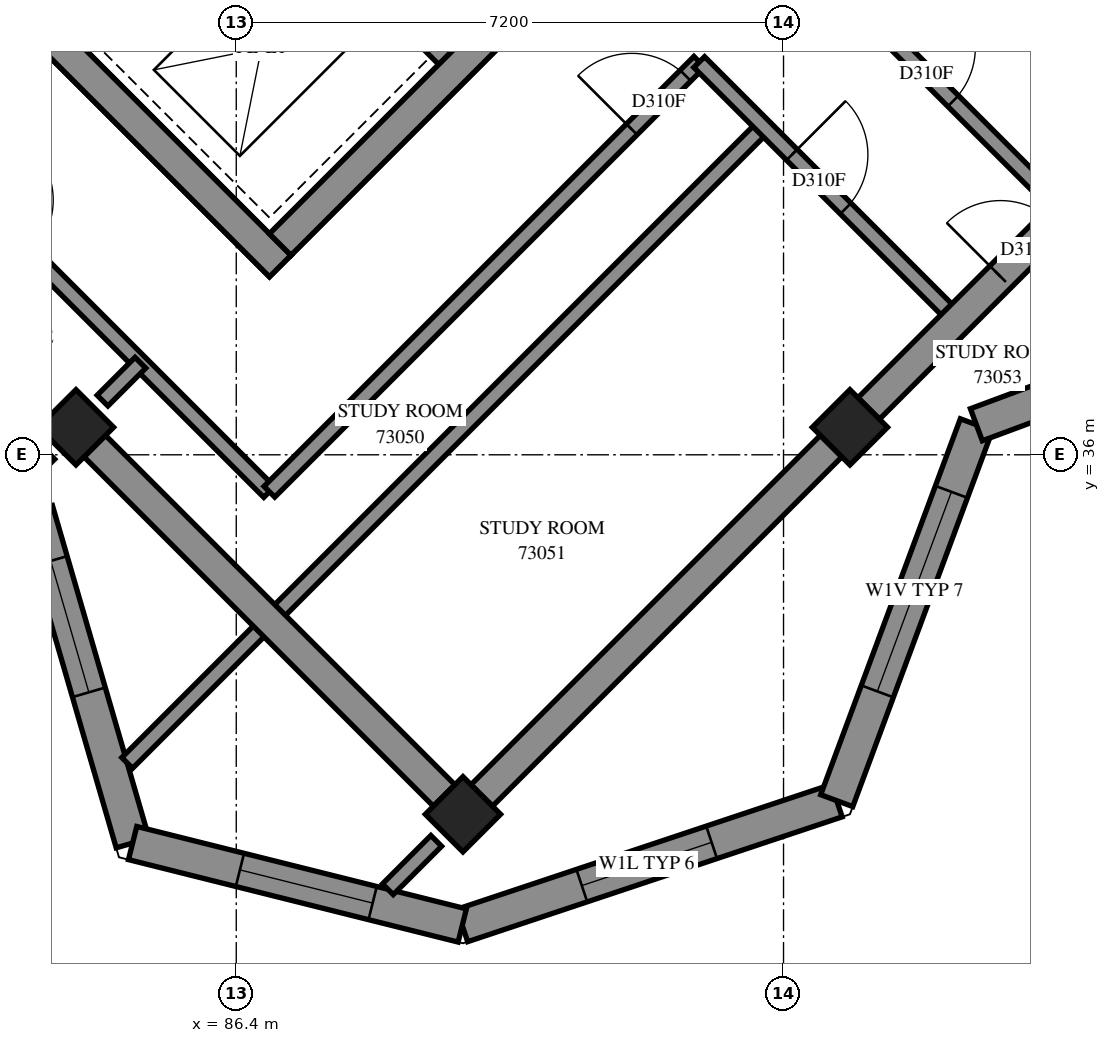
"""IFC4 building model, lengths in metres.
Left out: names, types, materials, properties, quantities, classifications, styles, units other than length and angle.
Written with IfcOpenShell. Run it as: python <this file> out.ifc"""

import sys

from ifc_helpers import new_model, si_unit, direction, frame, frame_2d, origin, origin_2d, place, context, subcontext, project, spatial, polyline, rectangle, outline, extrude, element, fill, save


model = new_model("IFC4")
c1 = context("Model", 3, precision=1e-05, world=origin(), true_north=direction((0.0, 1.0)))
c2 = subcontext(c1, "Body", "Model", "MODEL_VIEW")
j1 = project(units=[si_unit("LENGTHUNIT", "METRE"), si_unit("PLANEANGLEUNIT", "RADIAN")], contexts=[c1])
p1 = place(None, origin())
s1 = spatial("IfcSite", under=j1, at=p1, CompositionType="ELEMENT")
p2 = place(p1, origin())
s2 = spatial("IfcBuilding", under=s1, at=p2, CompositionType="ELEMENT")
p3 = place(p2, frame((0.0, 0.0, 267.6)))
s3 = spatial("IfcBuildingStorey", under=s2, at=p3, CompositionType="ELEMENT", Elevation=267.6)
for number, where, z_axis, x_axis in (
    (1, (84.291, 36.362, 0.0), (0.0, 0.0, 1.0), (0.707, -0.707, 0.0)),
    (2, (94.474, 36.362, 0.0), (0.0, 0.0, 1.0), (0.707, -0.707, 0.0)),
    (3, (89.382, 31.271, 0.0), (0.0, 0.0, 1.0), (0.707, -0.707, 0.0)),
):
    element("IfcColumn", number, at=place(p3, frame(where, z_axis=z_axis, x_axis=x_axis)), inside=s3, PredefinedType="COLUMN", context=c2, shape_type="SweptSolid", body=[
        extrude(rectangle(XDim=0.7, YDim=0.7, at=origin_2d()), origin(), (0.0, 0.0, 1.0), 3.1),
    ])
p4 = place(p3, frame((76.23, 49.231, -0.3), z_axis=(0.0, 0.0, 1.0), x_axis=(0.7071034917, -0.7071100706, 0.0)))
e4 = element("IfcWall", 4, at=p4, inside=s3, PredefinedType="SHEAR", context=c2, shape_type="SweptSolid", body=[
    extrude(rectangle(XDim=15.2, YDim=0.4, at=frame_2d((7.6, 0.0))), origin(), (0.0, 0.0, 1.0), 2.7),
])
p5 = place(p3, frame((86.978, 38.766, -0.3), z_axis=(0.0, 0.0, 1.0), x_axis=(0.7071067812, 0.7071067812, 0.0)))
e5 = element("IfcWall", 5, at=p5, inside=s3, PredefinedType="SHEAR", context=c2, shape_type="SweptSolid", body=[
    extrude(rectangle(XDim=14.4, YDim=0.4, at=frame_2d((7.2, 0.0))), origin(), (0.0, 0.0, 1.0), 2.7),
])
p6 = place(p5, frame((4.55, 0.0, 0.3)))
e6 = element("IfcOpeningElement", 6, at=p6, cuts=e5, PredefinedType="OPENING", context=c2, shape_type="SweptSolid", body=[
    extrude(rectangle(XDim=1.1, YDim=2.1, at=frame_2d((0.55, 1.05))), frame((0.0, 0.21, 0.0), z_axis=(0.0, -1.0, 0.0), x_axis=(1.0, 0.0, 0.0)), (0.0, 0.0, 1.0), 0.42),
])
p7 = place(p5, frame((11.35, 0.0, 0.3)))
e7 = element("IfcOpeningElement", 7, at=p7, cuts=e5, PredefinedType="OPENING", context=c2, shape_type="SweptSolid", body=[
    extrude(rectangle(XDim=1.1, YDim=2.1, at=frame_2d((0.55, 1.05))), frame((0.0, 0.21, 0.0), z_axis=(0.0, -1.0, 0.0), x_axis=(1.0, 0.0, 0.0)), (0.0, 0.0, 1.0), 0.42),
])
p8 = place(p3, frame((78.988, 51.423, 0.0), z_axis=(0.0, 0.0, 1.0), x_axis=(0.7071067812, -0.7071067812, 0.0)))
e8 = element("IfcWall", 8, at=p8, inside=s3, PredefinedType="SOLIDWALL", context=c2, shape_type="SweptSolid", body=[
    extrude(rectangle(XDim=14.4, YDim=0.3, at=frame_2d((7.2, 0.0))), origin(), (0.0, 0.0, 1.0), 3.1),
])
p9 = place(p8, frame((4.95, 0.0, 0.0)))
e9 = element("IfcOpeningElement", 9, at=p9, cuts=e8, PredefinedType="OPENING", context=c2, shape_type="SweptSolid", body=[
    extrude(rectangle(XDim=0.9, YDim=2.1, at=frame_2d((0.45, 1.05))), frame((0.0, 0.16, 0.0), z_axis=(0.0, -1.0, 0.0), x_axis=(1.0, 0.0, 0.0)), (0.0, 0.0, 1.0), 0.32),
])
p10 = place(p8, frame((8.55, 0.0, 0.0)))
e10 = element("IfcOpeningElement", 10, at=p10, cuts=e8, PredefinedType="OPENING", context=c2, shape_type="SweptSolid", body=[
    extrude(rectangle(XDim=0.9, YDim=2.1, at=frame_2d((0.45, 1.05))), frame((0.0, 0.16, 0.0), z_axis=(0.0, -1.0, 0.0), x_axis=(1.0, 0.0, 0.0)), (0.0, 0.0, 1.0), 0.32),
])
p11 = place(p8, frame((12.05, 0.0, 0.0)))
e11 = element("IfcOpeningElement", 11, at=p11, cuts=e8, PredefinedType="OPENING", context=c2, shape_type="SweptSolid", body=[
    extrude(rectangle(XDim=1.1, YDim=2.1, at=frame_2d((0.55, 1.05))), frame((0.0, 0.16, 0.0), z_axis=(0.0, -1.0, 0.0), x_axis=(1.0, 0.0, 0.0)), (0.0, 0.0, 1.0), 0.32),
])
p12 = place(p3, frame((89.373, 29.808, 0.0), z_axis=(0.0, 0.0, 1.0), x_axis=(0.9486871491, 0.3162162126, 0.0)))
e12 = element("IfcWall", 12, at=p12, inside=s3, PredefinedType="SOLIDWALL", context=c2, shape_type="SweptSolid", body=[
    extrude(outline(polyline([(-0.066, -0.225), (5.301, -0.225), (5.085, 0.225), (0.066, 0.225), (-0.066, -0.225)])), origin(), (0.0, 0.0, 1.0), 3.1),
])
p13 = place(p12, frame((1.658, 0.0, 0.6)))
e13 = element("IfcOpeningElement", 13, at=p13, cuts=e12, PredefinedType="OPENING", context=c2, shape_type="SweptSolid", body=[
    extrude(rectangle(XDim=1.8, YDim=1.9, at=frame_2d((0.9, 0.95))), frame((0.0, 0.235, 0.0), z_axis=(0.0, -1.0, 0.0), x_axis=(1.0, 0.0, 0.0)), (0.0, 0.0, 1.0), 0.47),
])
p14 = place(p3, frame((94.3, 31.45, 0.0), z_axis=(0.0, 0.0, 1.0), x_axis=(0.3481927166, 0.9374229739, 0.0)))
e14 = element("IfcWall", 14, at=p14, inside=s3, PredefinedType="SOLIDWALL", context=c2, shape_type="SweptSolid", body=[
    extrude(outline(polyline([(-0.108, -0.225), (5.172, -0.225), (5.379, 0.225), (0.108, 0.225), (-0.108, -0.225)])), origin(), (0.0, 0.0, 1.0), 3.1),
])
p15 = place(p14, frame((1.534, 0.0, 0.45)))
e15 = element("IfcOpeningElement", 15, at=p15, cuts=e14, PredefinedType="OPENING", context=c2, shape_type="SweptSolid", body=[
    extrude(rectangle(XDim=2.8, YDim=2.55, at=frame_2d((1.4, 1.275))), frame((0.0, 0.235, 0.0), z_axis=(0.0, -1.0, 0.0), x_axis=(1.0, 0.0, 0.0)), (0.0, 0.0, 1.0), 0.47),
])
p16 = place(p3, frame((96.137, 36.395, 0.0), z_axis=(0.0, 0.0, 1.0), x_axis=(0.937429161, 0.3481760591, 0.0)))
e16 = element("IfcWall", 16, at=p16, inside=s3, PredefinedType="SOLIDWALL", context=c2, shape_type="SweptSolid", body=[
    extrude(outline(polyline([(0.103, -0.225), (5.383, -0.225), (5.168, 0.225), (-0.103, 0.225), (0.103, -0.225)])), origin(), (0.0, 0.0, 1.0), 3.1),
])
p17 = place(p16, frame((1.651, 0.0, 0.45)))
e17 = element("IfcOpeningElement", 17, at=p17, cuts=e16, PredefinedType="OPENING", context=c2, shape_type="SweptSolid", body=[
    extrude(rectangle(XDim=2.8, YDim=2.55, at=frame_2d((1.4, 1.275))), frame((0.0, 0.235, 0.0), z_axis=(0.0, -1.0, 0.0), x_axis=(1.0, 0.0, 0.0)), (0.0, 0.0, 1.0), 0.47),
])
p18 = place(p3, frame((83.765, 35.271, 0.0), z_axis=(0.0, 0.0, 1.0), x_axis=(0.278831726, -0.9603399755, 0.0)))
e18 = element("IfcWall", 18, at=p18, inside=s3, PredefinedType="SOLIDWALL", context=c2, shape_type="SweptSolid", body=[
    extrude(outline(polyline([(0.124, -0.225), (4.689, -0.225), (4.43, 0.225), (-0.124, 0.225), (0.124, -0.225)])), origin(), (0.0, 0.0, 1.0), 2.6),
])
p19 = place(p18, frame((0.695, 0.0, 0.6)))
e19 = element("IfcOpeningElement", 19, at=p19, cuts=e18, PredefinedType="OPENING", context=c2, shape_type="SweptSolid", body=[
    extrude(rectangle(XDim=1.8, YDim=1.9, at=frame_2d((0.9, 0.95))), frame((0.0, 0.235, 0.0), z_axis=(0.0, -1.0, 0.0), x_axis=(1.0, 0.0, 0.0)), (0.0, 0.0, 1.0), 0.47),
])
p20 = place(p3, frame((85.037, 30.892, 0.0), z_axis=(0.0, 0.0, 1.0), x_axis=(0.970134604, -0.2425672073, 0.0)))
e20 = element("IfcWall", 20, at=p20, inside=s3, PredefinedType="SOLIDWALL", context=c2, shape_type="SweptSolid", body=[
    extrude(outline(polyline([(-0.129, -0.225), (4.536, -0.225), (4.405, 0.225), (0.129, 0.225), (-0.129, -0.225)])), origin(), (0.0, 0.0, 1.0), 2.6),
])
p21 = place(p20, frame((1.455, 0.0, 0.6)))
e21 = element("IfcOpeningElement", 21, at=p21, cuts=e20, PredefinedType="OPENING", context=c2, shape_type="SweptSolid", body=[
    extrude(rectangle(XDim=1.8, YDim=1.9, at=frame_2d((0.9, 0.95))), frame((0.0, 0.235, 0.0), z_axis=(0.0, -1.0, 0.0), x_axis=(1.0, 0.0, 0.0)), (0.0, 0.0, 1.0), 0.47),
])
p22 = place(p3, frame((84.965, 31.946, 0.0), z_axis=(0.0, 0.0, 1.0), x_axis=(0.7070265824, 0.7071869709, 0.0)))
e22 = element("IfcWall", 22, at=p22, inside=s3, PredefinedType="PARTITIONING", context=c2, shape_type="SweptSolid", body=[
    extrude(rectangle(XDim=11.846, YDim=0.2, at=frame_2d((5.923, 0.0))), origin(), (0.0, 0.0, 1.0), 3.1),
])
p23 = place(p3, frame((80.747, 41.597, 0.0), z_axis=(0.0, 0.0, 1.0), x_axis=(0.7071067812, -0.7071067812, 0.0)))
e23 = element("IfcWall", 23, at=p23, inside=s3, PredefinedType="PARTITIONING", context=c2, shape_type="SweptSolid", body=[
    extrude(rectangle(XDim=8.607, YDim=0.2, at=frame_2d((4.303, 0.0))), origin(), (0.0, 0.0, 1.0), 3.1),
])
p24 = place(p23, frame((0.195, 0.0, 0.0)))
e24 = element("IfcOpeningElement", 24, at=p24, cuts=e23, PredefinedType="OPENING", context=c2, shape_type="SweptSolid", body=[
    extrude(rectangle(XDim=1.0, YDim=2.1, at=frame_2d((0.5, 1.05))), frame((0.0, 0.11, 0.0), z_axis=(0.0, -1.0, 0.0), x_axis=(1.0, 0.0, 0.0)), (0.0, 0.0, 1.0), 0.22),
])
p25 = place(p23, frame((3.175, 0.0, 0.0)))
e25 = element("IfcOpeningElement", 25, at=p25, cuts=e23, PredefinedType="OPENING", context=c2, shape_type="SweptSolid", body=[
    extrude(rectangle(XDim=1.0, YDim=2.1, at=frame_2d((0.5, 1.05))), frame((0.0, 0.11, 0.0), z_axis=(0.0, -1.0, 0.0), x_axis=(1.0, 0.0, 0.0)), (0.0, 0.0, 1.0), 0.22),
])
p26 = place(p3, frame((86.836, 35.514, 0.0), z_axis=(0.0, 0.0, 1.0), x_axis=(0.7071067812, 0.7071067812, 0.0)))
e26 = element("IfcWall", 26, at=p26, inside=s3, PredefinedType="PARTITIONING", context=c2, shape_type="SweptSolid", body=[
    extrude(rectangle(XDim=7.999, YDim=0.2, at=frame_2d((3.999, 0.0))), origin(), (0.0, 0.0, 1.0), 3.1),
])
p27 = place(p26, frame((6.742, 0.0, 0.0)))
e27 = element("IfcOpeningElement", 27, at=p27, cuts=e26, PredefinedType="OPENING", context=c2, shape_type="SweptSolid", body=[
    extrude(rectangle(XDim=1.0, YDim=2.1, at=frame_2d((0.5, 1.05))), frame((0.0, 0.11, 0.0), z_axis=(0.0, -1.0, 0.0), x_axis=(1.0, 0.0, 0.0)), (0.0, 0.0, 1.0), 0.22),
])
p28 = place(p3, frame((89.731, 31.621, 0.0), z_axis=(0.0, 0.0, 1.0), x_axis=(0.7071067812, 0.7071067812, 0.0)))
e28 = element("IfcWall", 28, at=p28, inside=s3, PredefinedType="PARTITIONING", context=c2, shape_type="SweptSolid", body=[
    extrude(rectangle(XDim=6.211, YDim=0.2, at=frame_2d((3.106, 0.0))), origin(), (0.0, 0.0, 1.0), 2.6),
])
p29 = place(p3, frame((93.905, 42.581, 0.0), z_axis=(0.0, 0.0, 1.0), x_axis=(0.7071067812, -0.7071067812, 0.0)))
e29 = element("IfcWall", 29, at=p29, inside=s3, PredefinedType="PARTITIONING", context=c2, shape_type="SweptSolid", body=[
    extrude(rectangle(XDim=4.8, YDim=0.2, at=frame_2d((2.4, 0.0))), origin(), (0.0, 0.0, 1.0), 3.1),
])
p30 = place(p29, frame((1.725, 0.0, 0.0)))
e30 = element("IfcOpeningElement", 30, at=p30, cuts=e29, PredefinedType="OPENING", context=c2, shape_type="SweptSolid", body=[
    extrude(rectangle(XDim=1.0, YDim=2.1, at=frame_2d((0.5, 1.05))), frame((0.0, 0.11, 0.0), z_axis=(0.0, -1.0, 0.0), x_axis=(1.0, 0.0, 0.0)), (0.0, 0.0, 1.0), 0.22),
])
p31 = place(p3, frame((92.491, 41.167, 0.0), z_axis=(0.0, 0.0, 1.0), x_axis=(0.7071067812, -0.7071067812, 0.0)))
e31 = element("IfcWall", 31, at=p31, inside=s3, PredefinedType="PARTITIONING", context=c2, shape_type="SweptSolid", body=[
    extrude(rectangle(XDim=4.8, YDim=0.2, at=frame_2d((2.4, 0.0))), origin(), (0.0, 0.0, 1.0), 3.1),
])
p32 = place(p31, frame((1.725, 0.0, 0.0)))
e32 = element("IfcOpeningElement", 32, at=p32, cuts=e31, PredefinedType="OPENING", context=c2, shape_type="SweptSolid", body=[
    extrude(rectangle(XDim=1.0, YDim=2.1, at=frame_2d((0.5, 1.05))), frame((0.0, 0.11, 0.0), z_axis=(0.0, -1.0, 0.0), x_axis=(1.0, 0.0, 0.0)), (0.0, 0.0, 1.0), 0.22),
])
p33 = place(p3, frame((95.887, 37.777, 0.0), z_axis=(0.0, 0.0, 1.0), x_axis=(0.7071067812, 0.7071067812, 0.0)))
e33 = element("IfcWall", 33, at=p33, inside=s3, PredefinedType="PARTITIONING", context=c2, shape_type="SweptSolid", body=[
    extrude(rectangle(XDim=2.0, YDim=0.2, at=frame_2d((1.0, 0.0))), origin(), (0.0, 0.0, 1.0), 2.6),
])
p34 = place(p33, frame((0.803, 0.0, 0.0)))
e34 = element("IfcOpeningElement", 34, at=p34, cuts=e33, PredefinedType="OPENING", context=c2, shape_type="SweptSolid", body=[
    extrude(rectangle(XDim=1.0, YDim=2.1, at=frame_2d((0.5, 1.05))), frame((0.0, 0.11, 0.0), z_axis=(0.0, -1.0, 0.0), x_axis=(1.0, 0.0, 0.0)), (0.0, 0.0, 1.0), 0.22),
])
p35 = place(p3, frame((94.823, 36.713, 0.0), z_axis=(0.0, 0.0, 1.0), x_axis=(0.7071067812, 0.7071067812, 0.0)))
e35 = element("IfcWall", 35, at=p35, inside=s3, PredefinedType="PARTITIONING", context=c2, shape_type="SweptSolid", body=[
    extrude(rectangle(XDim=1.505, YDim=0.2, at=frame_2d((0.752, 0.0))), origin(), (0.0, 0.0, 1.0), 2.6),
])
p36 = place(p3, frame((88.394, 30.284, 0.0), z_axis=(0.0, 0.0, 1.0), x_axis=(0.7070512369, 0.7071623211, 0.0)))
e36 = element("IfcWall", 36, at=p36, inside=s3, PredefinedType="PARTITIONING", context=c2, shape_type="SweptSolid", body=[
    extrude(rectangle(XDim=0.9, YDim=0.2, at=frame_2d((0.45, 0.0))), origin(), (0.0, 0.0, 1.0), 2.6),
])
p37 = place(p3, frame((84.641, 36.713, 0.0), z_axis=(0.0, 0.0, 1.0), x_axis=(0.7071067812, 0.7071067812, 0.0)))
e37 = element("IfcWall", 37, at=p37, inside=s3, PredefinedType="PARTITIONING", context=c2, shape_type="SweptSolid", body=[
    extrude(rectangle(XDim=0.704, YDim=0.2, at=frame_2d((0.352, 0.0))), origin(), (0.0, 0.0, 1.0), 3.1),
])
p38 = place(p3, frame((83.506, 35.581, 0.0), z_axis=(0.0, 0.0, 1.0), x_axis=(0.7089790393, 0.7052295526, 0.0)))
e38 = element("IfcWall", 38, at=p38, inside=s3, PredefinedType="PARTITIONING", context=c2, shape_type="SweptSolid", body=[
    extrude(rectangle(XDim=0.613, YDim=0.2, at=frame_2d((0.307, 0.0))), origin(), (0.0, 0.0, 1.0), 2.6),
])
p39 = place(p13, origin())
e39 = element("IfcWindow", 39, at=p39, inside=s3, PartitioningType="SINGLE_PANEL", PredefinedType="WINDOW", context=c2, shape_type="SweptSolid", body=[
    extrude(rectangle(XDim=1.8, YDim=1.9, at=frame_2d((0.9, 0.95))), frame((0.0, 0.205, 0.0), z_axis=(0.0, -1.0, 0.0), x_axis=(1.0, 0.0, 0.0)), (0.0, 0.0, 1.0), 0.06),
])
fill(e13, e39)
p40 = place(p15, origin())
e40 = element("IfcWindow", 40, at=p40, inside=s3, PartitioningType="SINGLE_PANEL", PredefinedType="WINDOW", context=c2, shape_type="SweptSolid", body=[
    extrude(rectangle(XDim=2.8, YDim=2.55, at=frame_2d((1.4, 1.275))), frame((0.0, 0.205, 0.0), z_axis=(0.0, -1.0, 0.0), x_axis=(1.0, 0.0, 0.0)), (0.0, 0.0, 1.0), 0.06),
])
fill(e15, e40)
p41 = place(p19, origin())
e41 = element("IfcWindow", 41, at=p41, inside=s3, PartitioningType="SINGLE_PANEL", PredefinedType="WINDOW", context=c2, shape_type="SweptSolid", body=[
    extrude(rectangle(XDim=1.8, YDim=1.9, at=frame_2d((0.9, 0.95))), frame((0.0, 0.205, 0.0), z_axis=(0.0, -1.0, 0.0), x_axis=(1.0, 0.0, 0.0)), (0.0, 0.0, 1.0), 0.06),
])
fill(e19, e41)
p42 = place(p21, origin())
e42 = element("IfcWindow", 42, at=p42, inside=s3, PartitioningType="SINGLE_PANEL", PredefinedType="WINDOW", context=c2, shape_type="SweptSolid", body=[
    extrude(rectangle(XDim=1.8, YDim=1.9, at=frame_2d((0.9, 0.95))), frame((0.0, 0.205, 0.0), z_axis=(0.0, -1.0, 0.0), x_axis=(1.0, 0.0, 0.0)), (0.0, 0.0, 1.0), 0.06),
])
fill(e21, e42)
p43 = place(p27, origin())
e43 = element("IfcDoor", 43, at=p43, inside=s3, OperationType="SINGLE_SWING_RIGHT", PredefinedType="DOOR", context=c2, shape_type="SweptSolid", body=[
    extrude(rectangle(XDim=1.0, YDim=2.1, at=frame_2d((0.5, 1.05))), frame((0.0, 0.025, 0.0), z_axis=(0.0, -1.0, 0.0), x_axis=(1.0, 0.0, 0.0)), (0.0, 0.0, 1.0), 0.05),
])
fill(e27, e43)
p44 = place(p32, origin())
e44 = element("IfcDoor", 44, at=p44, inside=s3, OperationType="SINGLE_SWING_LEFT", PredefinedType="DOOR", context=c2, shape_type="SweptSolid", body=[
    extrude(rectangle(XDim=1.0, YDim=2.1, at=frame_2d((0.5, 1.05))), frame((0.0, 0.025, 0.0), z_axis=(0.0, -1.0, 0.0), x_axis=(1.0, 0.0, 0.0)), (0.0, 0.0, 1.0), 0.05),
])
fill(e32, e44)
p45 = place(p30, origin())
e45 = element("IfcDoor", 45, at=p45, inside=s3, OperationType="SINGLE_SWING_RIGHT", PredefinedType="DOOR", context=c2, shape_type="SweptSolid", body=[
    extrude(rectangle(XDim=1.0, YDim=2.1, at=frame_2d((0.5, 1.05))), frame((0.0, 0.025, 0.0), z_axis=(0.0, -1.0, 0.0), x_axis=(1.0, 0.0, 0.0)), (0.0, 0.0, 1.0), 0.05),
])
fill(e30, e45)
p46 = place(p34, origin())
e46 = element("IfcDoor", 46, at=p46, inside=s3, OperationType="SINGLE_SWING_RIGHT", PredefinedType="DOOR", context=c2, shape_type="SweptSolid", body=[
    extrude(rectangle(XDim=1.0, YDim=2.1, at=frame_2d((0.5, 1.05))), frame((0.0, 0.025, 0.0), z_axis=(0.0, -1.0, 0.0), x_axis=(1.0, 0.0, 0.0)), (0.0, 0.0, 1.0), 0.05),
])
fill(e34, e46)
save(model, sys.argv[1])
